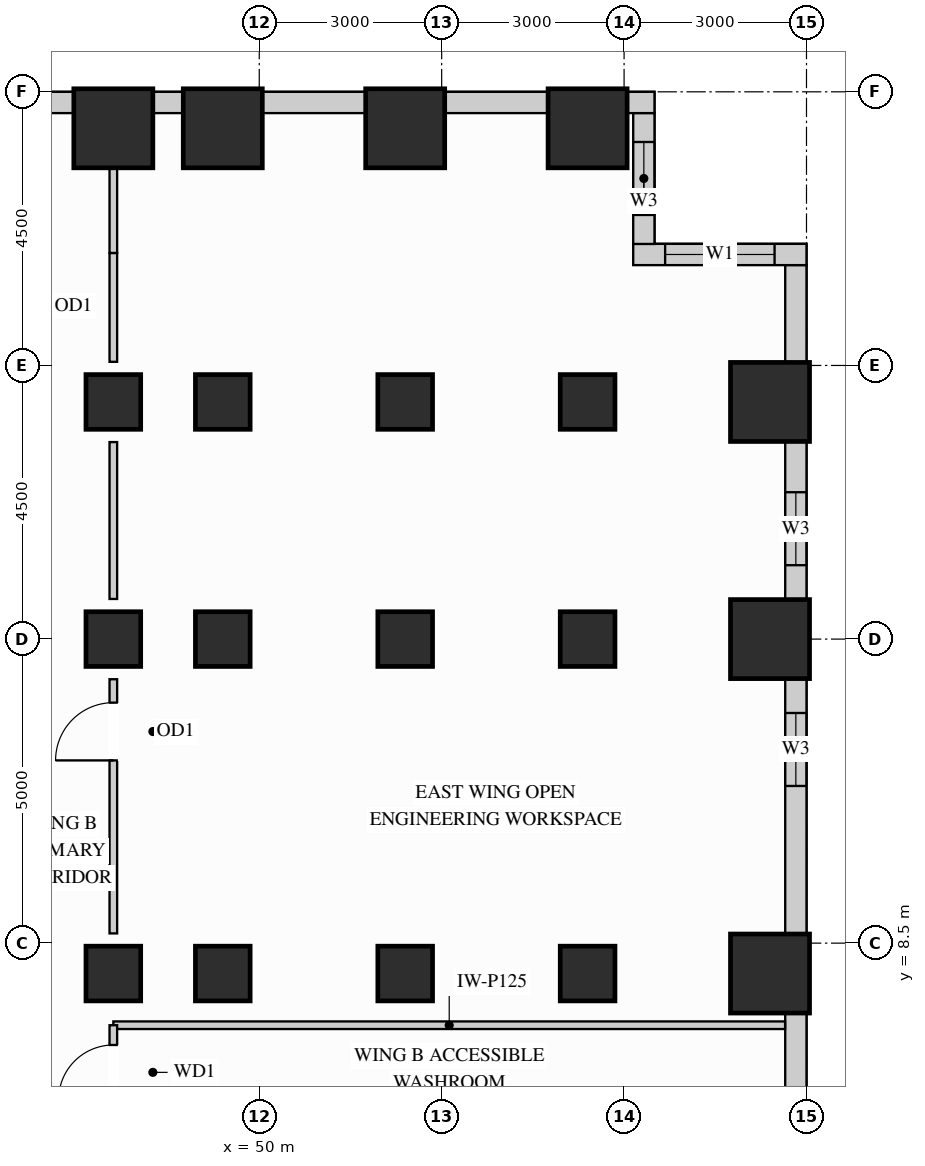
"""IFC4 building model, lengths in metres.
Left out: names, types, materials, properties, quantities, classifications, styles, units other than length and angle.
Written with IfcOpenShell. Run it as: python <this file> out.ifc"""

import sys

from ifc_helpers import new_model, si_unit, direction, frame, frame_2d, origin, origin_2d, place, context, subcontext, project, spatial, rectangle, extrude, source, transform, mapped, element, fill, save


model = new_model("IFC4")
c1 = context("Model", 3, precision=1e-05, world=origin(), true_north=direction((0.0, 1.0)))
c2 = subcontext(c1, "Body", "Model", "MODEL_VIEW")
j1 = project(units=[si_unit("LENGTHUNIT", "METRE"), si_unit("PLANEANGLEUNIT", "RADIAN")], contexts=[c1])
p1 = place(None, origin())
s1 = spatial("IfcSite", under=j1, at=p1, CompositionType="ELEMENT")
p2 = place(p1, origin())
s2 = spatial("IfcBuilding", under=s1, at=p2, CompositionType="ELEMENT")
p3 = place(p2, frame((0.0, 0.0, 22.5)))
s3 = spatial("IfcBuildingStorey", under=s2, at=p3, CompositionType="ELEMENT", Elevation=22.5)
m1 = source(origin(), c2, "Body", "SweptSolid", [
    extrude(rectangle(XDim=0.9, YDim=0.9, at=origin_2d()), origin(), (0.0, 0.0, 1.0), 3.38),
])
for number, where, z_axis, x_axis in (
    (1, (47.6, 13.5, 0.0), (0.0, 0.0, 1.0), (1.0, 0.0, 0.0)),
    (2, (47.6, 8.0, 0.0), (0.0, 0.0, 1.0), (1.0, 0.0, 0.0)),
    (3, (47.6, 17.4, 0.0), (0.0, 0.0, 1.0), (1.0, 0.0, 0.0)),
    (4, (49.4, 13.5, 0.0), (0.0, 0.0, 1.0), (1.0, 0.0, 0.0)),
    (5, (49.4, 17.4, 0.0), (0.0, 0.0, 1.0), (1.0, 0.0, 0.0)),
    (6, (49.4, 8.0, 0.0), (0.0, 0.0, 1.0), (1.0, 0.0, 0.0)),
    (7, (52.4, 13.5, 0.0), (0.0, 0.0, 1.0), (1.0, 0.0, 0.0)),
    (8, (52.4, 17.4, 0.0), (0.0, 0.0, 1.0), (1.0, 0.0, 0.0)),
    (9, (52.4, 8.0, 0.0), (0.0, 0.0, 1.0), (1.0, 0.0, 0.0)),
    (10, (55.4, 13.5, 0.0), (0.0, 0.0, 1.0), (1.0, 0.0, 0.0)),
    (11, (55.4, 17.4, 0.0), (0.0, 0.0, 1.0), (1.0, 0.0, 0.0)),
    (12, (55.4, 8.0, 0.0), (0.0, 0.0, 1.0), (1.0, 0.0, 0.0)),
):
    element("IfcColumn", number, at=place(p3, frame(where, z_axis=z_axis, x_axis=x_axis)), inside=s3, PredefinedType="COLUMN", context=c2, shape_type="MappedRepresentation", body=[
        mapped(m1, transform((0.0, 0.0, 0.0), x_axis=(1.0, 0.0, 0.0), y_axis=(0.0, 1.0, 0.0), z_axis=(0.0, 0.0, 1.0))),
    ])
m2 = source(origin(), c2, "Body", "SweptSolid", [
    extrude(rectangle(XDim=1.3, YDim=1.3, at=origin_2d()), origin(), (0.0, 0.0, 1.0), 3.38),
])
for number, where, z_axis, x_axis in (
    (13, (47.6, 21.9, 0.0), (0.0, 0.0, 1.0), (1.0, 0.0, 0.0)),
    (14, (49.4, 21.9, 0.0), (0.0, 0.0, 1.0), (1.0, 0.0, 0.0)),
    (15, (52.4, 21.9, 0.0), (0.0, 0.0, 1.0), (1.0, 0.0, 0.0)),
    (16, (55.4, 21.9, 0.0), (0.0, 0.0, 1.0), (1.0, 0.0, 0.0)),
    (17, (58.4, 13.5, 0.0), (0.0, 0.0, 1.0), (1.0, 0.0, 0.0)),
    (18, (58.4, 17.4, 0.0), (0.0, 0.0, 1.0), (1.0, 0.0, 0.0)),
    (19, (58.4, 8.0, 0.0), (0.0, 0.0, 1.0), (1.0, 0.0, 0.0)),
):
    element("IfcColumn", number, at=place(p3, frame(where, z_axis=z_axis, x_axis=x_axis)), inside=s3, PredefinedType="COLUMN", context=c2, shape_type="MappedRepresentation", body=[
        mapped(m2, transform((0.0, 0.0, 0.0), x_axis=(1.0, 0.0, 0.0), y_axis=(0.0, 1.0, 0.0), z_axis=(0.0, 0.0, 1.0))),
    ])
m3 = source(origin(), c2, "Body", "SweptSolid", [
    extrude(rectangle(XDim=3.204, YDim=0.35, at=frame_2d((1.602, 0.0))), origin(), (0.0, 0.0, 1.0), 2.51),
])
p4 = place(p3, frame((58.825, 4.148, 0.0), z_axis=(0.0, 0.0, 1.0), x_axis=(0.0, 1.0, 0.0)))
e20 = element("IfcWall", 20, at=p4, inside=s3, PredefinedType="SOLIDWALL", context=c2, shape_type="MappedRepresentation", body=[
    mapped(m3, transform((0.0, 0.0, 0.0), x_axis=(1.0, 0.0, 0.0), y_axis=(0.0, 1.0, 0.0), z_axis=(0.0, 0.0, 1.0))),
])
p5 = place(p3, frame((58.825, 8.648, 0.0), z_axis=(0.0, 0.0, 1.0), x_axis=(0.0, 1.0, 0.0)))
e21 = element("IfcWall", 21, at=p5, inside=s3, PredefinedType="SOLIDWALL", context=c2, shape_type="SweptSolid", body=[
    extrude(rectangle(XDim=4.204, YDim=0.35, at=frame_2d((2.102, 0.0))), origin(), (0.0, 0.0, 1.0), 2.51),
])
p6 = place(p5, frame((2.437, 0.0, 0.78)))
e22 = element("IfcOpeningElement", 22, at=p6, cuts=e21, PredefinedType="OPENING", context=c2, shape_type="SweptSolid", body=[
    extrude(rectangle(XDim=1.2, YDim=1.55, at=frame_2d((0.6, 0.775))), frame((0.0, 0.185, 0.0), z_axis=(0.0, -1.0, 0.0), x_axis=(1.0, 0.0, 0.0)), (0.0, 0.0, 1.0), 0.37),
])
p7 = place(p3, frame((58.825, 14.148, 0.0), z_axis=(0.0, 0.0, 1.0), x_axis=(0.0, 1.0, 0.0)))
e23 = element("IfcWall", 23, at=p7, inside=s3, PredefinedType="SOLIDWALL", context=c2, shape_type="SweptSolid", body=[
    extrude(rectangle(XDim=2.604, YDim=0.35, at=frame_2d((1.302, 0.0))), origin(), (0.0, 0.0, 1.0), 2.51),
])
p8 = place(p7, frame((0.567, 0.0, 0.78)))
e24 = element("IfcOpeningElement", 24, at=p8, cuts=e23, PredefinedType="OPENING", context=c2, shape_type="SweptSolid", body=[
    extrude(rectangle(XDim=1.2, YDim=1.55, at=frame_2d((0.6, 0.775))), frame((0.0, 0.185, 0.0), z_axis=(0.0, -1.0, 0.0), x_axis=(1.0, 0.0, 0.0)), (0.0, 0.0, 1.0), 0.37),
])
m4 = source(origin(), c2, "Body", "SweptSolid", [
    extrude(rectangle(XDim=1.604, YDim=0.35, at=frame_2d((0.802, 0.0))), origin(), (0.0, 0.0, 1.0), 3.365),
])
p9 = place(p3, frame((58.825, 18.048, 0.0), z_axis=(0.0, 0.0, 1.0), x_axis=(0.0, 1.0, 0.0)))
e25 = element("IfcWall", 25, at=p9, inside=s3, PredefinedType="SOLIDWALL", context=c2, shape_type="MappedRepresentation", body=[
    mapped(m4, transform((0.0, 0.0, 0.0), x_axis=(1.0, 0.0, 0.0), y_axis=(0.0, 1.0, 0.0), z_axis=(0.0, 0.0, 1.0))),
])
p10 = place(p3, frame((59.0, 19.825, 0.0), z_axis=(0.0, 0.0, 1.0), x_axis=(-1.0, 0.0, 0.0)))
e26 = element("IfcWall", 26, at=p10, inside=s3, PredefinedType="SOLIDWALL", context=c2, shape_type="SweptSolid", body=[
    extrude(rectangle(XDim=2.85, YDim=0.35, at=frame_2d((1.425, 0.0))), origin(), (0.0, 0.0, 1.0), 3.365),
])
p11 = place(p10, frame((0.525, 0.0, 0.78)))
e27 = element("IfcOpeningElement", 27, at=p11, cuts=e26, PredefinedType="OPENING", context=c2, shape_type="SweptSolid", body=[
    extrude(rectangle(XDim=1.8, YDim=2.1, at=frame_2d((0.9, 1.05))), frame((0.0, 0.185, 0.0), z_axis=(0.0, -1.0, 0.0), x_axis=(1.0, 0.0, 0.0)), (0.0, 0.0, 1.0), 0.37),
])
p12 = place(p3, frame((56.325, 19.998, 0.0), z_axis=(0.0, 0.0, 1.0), x_axis=(0.0, 1.0, 0.0)))
e28 = element("IfcWall", 28, at=p12, inside=s3, PredefinedType="SOLIDWALL", context=c2, shape_type="SweptSolid", body=[
    extrude(rectangle(XDim=2.154, YDim=0.35, at=frame_2d((1.077, 0.0))), origin(), (0.0, 0.0, 1.0), 3.365),
])
p13 = place(p12, frame((0.477, 0.0, 0.78)))
e29 = element("IfcOpeningElement", 29, at=p13, cuts=e28, PredefinedType="OPENING", context=c2, shape_type="SweptSolid", body=[
    extrude(rectangle(XDim=1.2, YDim=2.1, at=frame_2d((0.6, 1.05))), frame((0.0, 0.185, 0.0), z_axis=(0.0, -1.0, 0.0), x_axis=(1.0, 0.0, 0.0)), (0.0, 0.0, 1.0), 0.37),
])
m5 = source(origin(), c2, "Body", "SweptSolid", [
    extrude(rectangle(XDim=0.452, YDim=0.35, at=frame_2d((0.226, 0.0))), origin(), (0.0, 0.0, 1.0), 3.365),
])
p14 = place(p3, frame((56.5, 22.325, 0.0), z_axis=(0.0, 0.0, 1.0), x_axis=(-1.0, 0.0, 0.0)))
e30 = element("IfcWall", 30, at=p14, inside=s3, PredefinedType="SOLIDWALL", context=c2, shape_type="MappedRepresentation", body=[
    mapped(m5, transform((0.0, 0.0, 0.0), x_axis=(1.0, 0.0, 0.0), y_axis=(0.0, 1.0, 0.0), z_axis=(0.0, 0.0, 1.0))),
])
m6 = source(origin(), c2, "Body", "SweptSolid", [
    extrude(rectangle(XDim=1.704, YDim=0.35, at=frame_2d((0.852, 0.0))), origin(), (0.0, 0.0, 1.0), 2.51),
])
for number, where, z_axis, x_axis in (
    (31, (54.752, 22.325, 0.0), (0.0, 0.0, 1.0), (-1.0, 0.0, 0.0)),
    (32, (51.752, 22.325, 0.0), (0.0, 0.0, 1.0), (-1.0, 0.0, 0.0)),
):
    element("IfcWall", number, at=place(p3, frame(where, z_axis=z_axis, x_axis=x_axis)), inside=s3, PredefinedType="SOLIDWALL", context=c2, shape_type="MappedRepresentation", body=[
        mapped(m6, transform((0.0, 0.0, 0.0), x_axis=(1.0, 0.0, 0.0), y_axis=(0.0, 1.0, 0.0), z_axis=(0.0, 0.0, 1.0))),
    ])
m7 = source(origin(), c2, "Body", "SweptSolid", [
    extrude(rectangle(XDim=0.504, YDim=0.35, at=frame_2d((0.252, 0.0))), origin(), (0.0, 0.0, 1.0), 3.365),
])
p15 = place(p3, frame((48.752, 22.325, 0.0), z_axis=(0.0, 0.0, 1.0), x_axis=(-1.0, 0.0, 0.0)))
e33 = element("IfcWall", 33, at=p15, inside=s3, PredefinedType="SOLIDWALL", context=c2, shape_type="MappedRepresentation", body=[
    mapped(m7, transform((0.0, 0.0, 0.0), x_axis=(1.0, 0.0, 0.0), y_axis=(0.0, 1.0, 0.0), z_axis=(0.0, 0.0, 1.0))),
])
p16 = place(p3, frame((46.952, 22.325, 0.0), z_axis=(0.0, 0.0, 1.0), x_axis=(-1.0, 0.0, 0.0)))
e34 = element("IfcWall", 34, at=p16, inside=s3, PredefinedType="SOLIDWALL", context=c2, shape_type="SweptSolid", body=[
    extrude(rectangle(XDim=6.304, YDim=0.35, at=frame_2d((3.152, 0.0))), origin(), (0.0, 0.0, 1.0), 2.51),
])
p17 = place(p16, frame((1.649, 0.0, 0.78)))
e35 = element("IfcOpeningElement", 35, at=p17, cuts=e34, PredefinedType="OPENING", context=c2, shape_type="SweptSolid", body=[
    extrude(rectangle(XDim=1.8, YDim=1.55, at=frame_2d((0.9, 0.775))), frame((0.0, 0.185, 0.0), z_axis=(0.0, -1.0, 0.0), x_axis=(1.0, 0.0, 0.0)), (0.0, 0.0, 1.0), 0.37),
])
p18 = place(p16, frame((3.817, 0.0, 0.78)))
e36 = element("IfcOpeningElement", 36, at=p18, cuts=e34, PredefinedType="OPENING", context=c2, shape_type="SweptSolid", body=[
    extrude(rectangle(XDim=1.8, YDim=1.55, at=frame_2d((0.9, 0.775))), frame((0.0, 0.185, 0.0), z_axis=(0.0, -1.0, 0.0), x_axis=(1.0, 0.0, 0.0)), (0.0, 0.0, 1.0), 0.37),
])
m8 = source(origin(), c2, "Body", "SweptSolid", [
    extrude(rectangle(XDim=11.048, YDim=0.125, at=frame_2d((5.524, 0.0))), origin(), (0.0, 0.0, 1.0), 3.365),
])
p19 = place(p3, frame((47.6, 7.15, 0.0), z_axis=(0.0, 0.0, 1.0), x_axis=(1.0, 0.0, 0.0)))
e37 = element("IfcWall", 37, at=p19, inside=s3, PredefinedType="PARTITIONING", context=c2, shape_type="MappedRepresentation", body=[
    mapped(m8, transform((0.0, 0.0, 0.0), x_axis=(1.0, 0.0, 0.0), y_axis=(0.0, 1.0, 0.0), z_axis=(0.0, 0.0, 1.0))),
])
p20 = place(p3, frame((47.6, 8.66, 0.0), z_axis=(0.0, 0.0, 1.0), x_axis=(0.0, 1.0, 0.0)))
e38 = element("IfcWall", 38, at=p20, inside=s3, PredefinedType="PARTITIONING", context=c2, shape_type="SweptSolid", body=[
    extrude(rectangle(XDim=4.18, YDim=0.125, at=frame_2d((2.09, 0.0))), origin(), (0.0, 0.0, 1.0), 2.67),
])
p21 = place(p20, frame((2.845, 0.0, 0.0)))
e39 = element("IfcOpeningElement", 39, at=p21, cuts=e38, PredefinedType="OPENING", context=c2, shape_type="SweptSolid", body=[
    extrude(rectangle(XDim=0.95, YDim=2.15, at=frame_2d((0.475, 1.075))), frame((0.0, 0.073, 0.0), z_axis=(0.0, -1.0, 0.0), x_axis=(1.0, 0.0, 0.0)), (0.0, 0.0, 1.0), 0.145),
])
m9 = source(origin(), c2, "Body", "SweptSolid", [
    extrude(rectangle(XDim=2.58, YDim=0.125, at=frame_2d((1.29, 0.0))), origin(), (0.0, 0.0, 1.0), 2.67),
])
p22 = place(p3, frame((47.6, 14.16, 0.0), z_axis=(0.0, 0.0, 1.0), x_axis=(0.0, 1.0, 0.0)))
e40 = element("IfcWall", 40, at=p22, inside=s3, PredefinedType="PARTITIONING", context=c2, shape_type="MappedRepresentation", body=[
    mapped(m9, transform((0.0, 0.0, 0.0), x_axis=(1.0, 0.0, 0.0), y_axis=(0.0, 1.0, 0.0), z_axis=(0.0, 0.0, 1.0))),
])
m10 = source(origin(), c2, "Body", "SweptSolid", [
    extrude(rectangle(XDim=1.79, YDim=0.125, at=frame_2d((0.895, 0.0))), origin(), (0.0, 0.0, 1.0), 2.67),
])
p23 = place(p3, frame((47.6, 18.06, 0.0), z_axis=(0.0, 0.0, 1.0), x_axis=(0.0, 1.0, 0.0)))
e41 = element("IfcWall", 41, at=p23, inside=s3, PredefinedType="PARTITIONING", context=c2, shape_type="MappedRepresentation", body=[
    mapped(m10, transform((0.0, 0.0, 0.0), x_axis=(1.0, 0.0, 0.0), y_axis=(0.0, 1.0, 0.0), z_axis=(0.0, 0.0, 1.0))),
])
m11 = source(origin(), c2, "Body", "SweptSolid", [
    extrude(rectangle(XDim=1.39, YDim=0.125, at=frame_2d((0.695, 0.0))), origin(), (0.0, 0.0, 1.0), 2.67),
])
p24 = place(p3, frame((47.6, 19.85, 0.0), z_axis=(0.0, 0.0, 1.0), x_axis=(0.0, 1.0, 0.0)))
e42 = element("IfcWall", 42, at=p24, inside=s3, PredefinedType="PARTITIONING", context=c2, shape_type="MappedRepresentation", body=[
    mapped(m11, transform((0.0, 0.0, 0.0), x_axis=(1.0, 0.0, 0.0), y_axis=(0.0, 1.0, 0.0), z_axis=(0.0, 0.0, 1.0))),
])
p25 = place(p3, frame((47.6, 5.65, 0.0), z_axis=(0.0, 0.0, 1.0), x_axis=(0.0, 1.0, 0.0)))
e43 = element("IfcWall", 43, at=p25, inside=s3, PredefinedType="PARTITIONING", context=c2, shape_type="SweptSolid", body=[
    extrude(rectangle(XDim=1.5, YDim=0.125, at=frame_2d((0.75, 0.0))), origin(), (0.0, 0.0, 1.0), 2.67),
])
p26 = place(p25, frame((0.275, 0.0, 0.0)))
e44 = element("IfcOpeningElement", 44, at=p26, cuts=e43, PredefinedType="OPENING", context=c2, shape_type="SweptSolid", body=[
    extrude(rectangle(XDim=0.9, YDim=2.15, at=frame_2d((0.45, 1.075))), frame((0.0, 0.073, 0.0), z_axis=(0.0, -1.0, 0.0), x_axis=(1.0, 0.0, 0.0)), (0.0, 0.0, 1.0), 0.145),
])
m12 = source(origin(), c2, "Body", "SweptSolid", [
    extrude(rectangle(XDim=0.95, YDim=2.15, at=frame_2d((0.475, 1.075))), frame((0.0, 0.025, 0.0), z_axis=(0.0, -1.0, 0.0), x_axis=(1.0, 0.0, 0.0)), (0.0, 0.0, 1.0), 0.05),
])
p27 = place(p21, origin())
e45 = element("IfcDoor", 45, at=p27, inside=s3, OperationType="SINGLE_SWING_LEFT", PredefinedType="DOOR", context=c2, shape_type="MappedRepresentation", body=[
    mapped(m12, transform((0.0, 0.0, 0.0), x_axis=(1.0, 0.0, 0.0), y_axis=(0.0, 1.0, 0.0), z_axis=(0.0, 0.0, 1.0))),
])
fill(e39, e45)
m13 = source(origin(), c2, "Body", "SweptSolid", [
    extrude(rectangle(XDim=0.9, YDim=2.15, at=frame_2d((0.45, 1.075))), frame((0.0, 0.025, 0.0), z_axis=(0.0, -1.0, 0.0), x_axis=(1.0, 0.0, 0.0)), (0.0, 0.0, 1.0), 0.05),
])
p28 = place(p26, origin())
e46 = element("IfcDoor", 46, at=p28, inside=s3, OperationType="SINGLE_SWING_LEFT", PredefinedType="DOOR", context=c2, shape_type="MappedRepresentation", body=[
    mapped(m13, transform((0.0, 0.0, 0.0), x_axis=(1.0, 0.0, 0.0), y_axis=(0.0, 1.0, 0.0), z_axis=(0.0, 0.0, 1.0))),
])
fill(e44, e46)
m14 = source(origin(), c2, "Body", "SweptSolid", [
    extrude(rectangle(XDim=1.8, YDim=2.1, at=frame_2d((0.9, 1.05))), frame((0.0, 0.03, 0.0), z_axis=(0.0, -1.0, 0.0), x_axis=(1.0, 0.0, 0.0)), (0.0, 0.0, 1.0), 0.06),
])
p29 = place(p11, origin())
e47 = element("IfcWindow", 47, at=p29, inside=s3, PartitioningType="SINGLE_PANEL", PredefinedType="WINDOW", context=c2, shape_type="MappedRepresentation", body=[
    mapped(m14, transform((0.0, 0.0, 0.0), x_axis=(1.0, 0.0, 0.0), y_axis=(0.0, 1.0, 0.0), z_axis=(0.0, 0.0, 1.0))),
])
fill(e27, e47)
m15 = source(origin(), c2, "Body", "SweptSolid", [
    extrude(rectangle(XDim=1.2, YDim=1.55, at=frame_2d((0.6, 0.775))), frame((0.0, 0.03, 0.0), z_axis=(0.0, -1.0, 0.0), x_axis=(1.0, 0.0, 0.0)), (0.0, 0.0, 1.0), 0.06),
])
p30 = place(p6, origin())
e48 = element("IfcWindow", 48, at=p30, inside=s3, PartitioningType="SINGLE_PANEL", PredefinedType="WINDOW", context=c2, shape_type="MappedRepresentation", body=[
    mapped(m15, transform((0.0, 0.0, 0.0), x_axis=(1.0, 0.0, 0.0), y_axis=(0.0, 1.0, 0.0), z_axis=(0.0, 0.0, 1.0))),
])
fill(e22, e48)
p31 = place(p8, origin())
e49 = element("IfcWindow", 49, at=p31, inside=s3, PartitioningType="SINGLE_PANEL", PredefinedType="WINDOW", context=c2, shape_type="MappedRepresentation", body=[
    mapped(m15, transform((0.0, 0.0, 0.0), x_axis=(1.0, 0.0, 0.0), y_axis=(0.0, 1.0, 0.0), z_axis=(0.0, 0.0, 1.0))),
])
fill(e24, e49)
m16 = source(origin(), c2, "Body", "SweptSolid", [
    extrude(rectangle(XDim=1.2, YDim=2.1, at=frame_2d((0.6, 1.05))), frame((0.0, 0.03, 0.0), z_axis=(0.0, -1.0, 0.0), x_axis=(1.0, 0.0, 0.0)), (0.0, 0.0, 1.0), 0.06),
])
p32 = place(p13, origin())
e50 = element("IfcWindow", 50, at=p32, inside=s3, PartitioningType="SINGLE_PANEL", PredefinedType="WINDOW", context=c2, shape_type="MappedRepresentation", body=[
    mapped(m16, transform((0.0, 0.0, 0.0), x_axis=(1.0, 0.0, 0.0), y_axis=(0.0, 1.0, 0.0), z_axis=(0.0, 0.0, 1.0))),
])
fill(e29, e50)
save(model, sys.argv[1])
